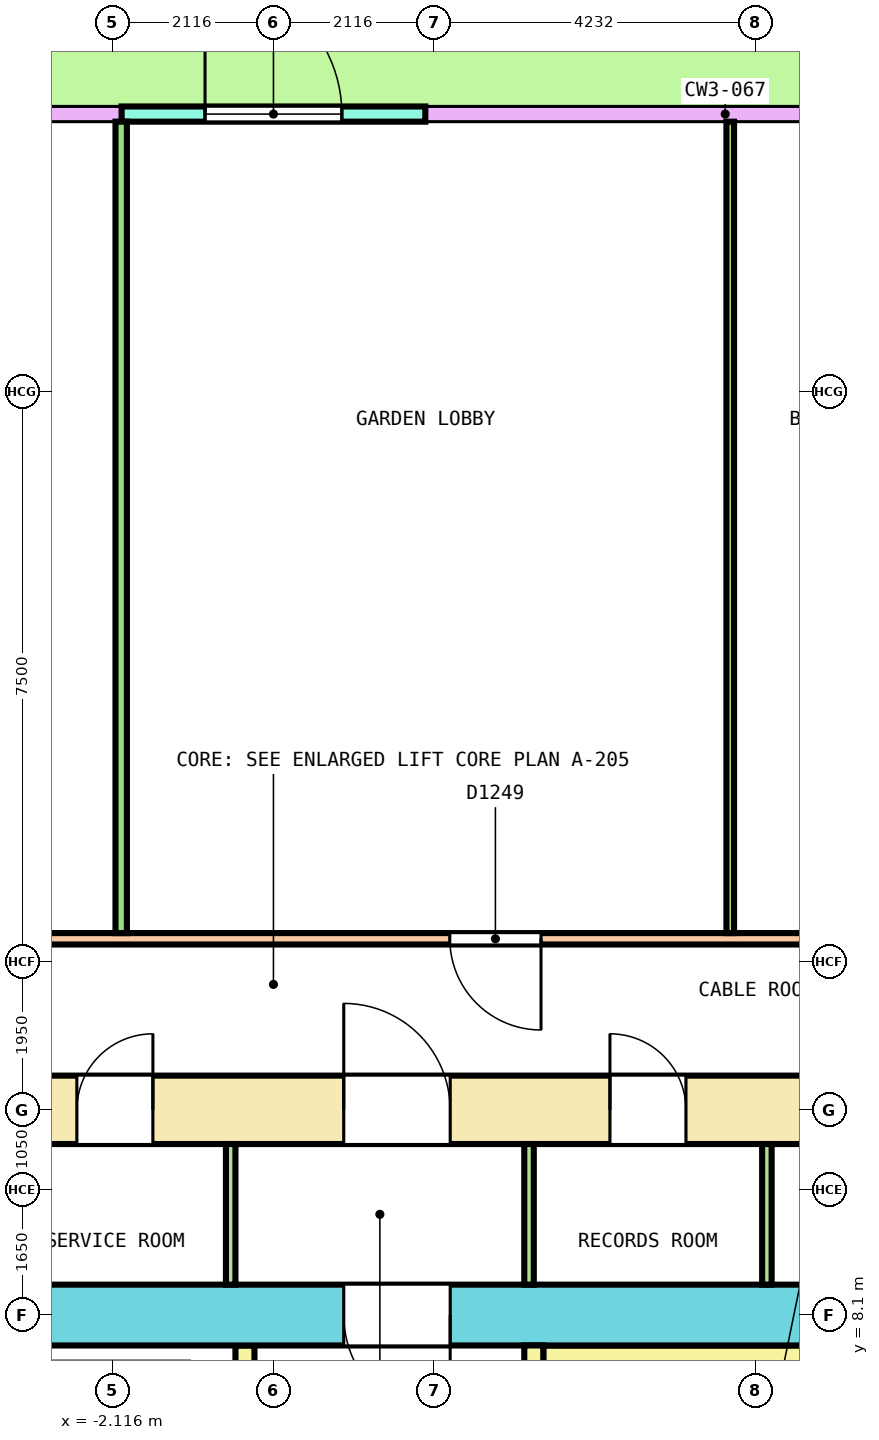
"""IFC4 building model, lengths in metres.
Left out: names, types, materials, properties, quantities, classifications, styles, units other than length and angle.
Written with IfcOpenShell. Run it as: python <this file> out.ifc"""

import sys

from ifc_helpers import new_model, si_unit, direction, frame, frame_2d, origin, place, context, subcontext, project, spatial, rectangle, extrude, element, fill, save


model = new_model("IFC4")
c1 = context("Model", 3, precision=1e-05, world=origin(), true_north=direction((0.0, 1.0)))
c2 = subcontext(c1, "Body", "Model", "MODEL_VIEW")
j1 = project(units=[si_unit("LENGTHUNIT", "METRE"), si_unit("PLANEANGLEUNIT", "RADIAN")], contexts=[c1])
p1 = place(None, origin())
s1 = spatial("IfcSite", under=j1, at=p1, CompositionType="ELEMENT")
p2 = place(p1, origin())
s2 = spatial("IfcBuilding", under=s1, at=p2, CompositionType="ELEMENT")
p3 = place(p2, frame((0.0, 0.0, 19.0)))
s3 = spatial("IfcBuildingStorey", under=s2, at=p3, CompositionType="ELEMENT", Elevation=19.0)
p4 = place(p3, frame((1.998, 23.9, 0.0), z_axis=(0.0, 0.0, 1.0), x_axis=(-1.0, 0.0, 0.0)))
e1 = element("IfcWall", 1, at=p4, inside=s3, PredefinedType="SOLIDWALL", context=c2, shape_type="SweptSolid", body=[
    extrude(rectangle(XDim=3.996, YDim=0.2, at=frame_2d((1.998, 0.0))), origin(), (0.0, 0.0, 1.0), 4.1),
])
p5 = place(p4, frame((1.098, 0.0, 0.0)))
e2 = element("IfcOpeningElement", 2, at=p5, cuts=e1, PredefinedType="OPENING", context=c2, shape_type="SweptSolid", body=[
    extrude(rectangle(XDim=1.8, YDim=2.4, at=frame_2d((0.9, 1.2))), frame((0.0, 0.11, 0.0), z_axis=(0.0, -1.0, 0.0), x_axis=(1.0, 0.0, 0.0)), (0.0, 0.0, 1.0), 0.22),
])
p6 = place(p4, frame((1.098, 0.0, 2.55)))
e3 = element("IfcOpeningElement", 3, at=p6, cuts=e1, PredefinedType="OPENING", context=c2, shape_type="SweptSolid", body=[
    extrude(rectangle(XDim=1.8, YDim=0.45, at=frame_2d((0.9, 0.225))), frame((0.0, 0.11, 0.0), z_axis=(0.0, -1.0, 0.0), x_axis=(1.0, 0.0, 0.0)), (0.0, 0.0, 1.0), 0.22),
])
p7 = place(p3, frame((-13.65, 10.8, 0.0), z_axis=(0.0, 0.0, 1.0), x_axis=(1.0, 0.0, 0.0)))
e4 = element("IfcWall", 4, at=p7, inside=s3, PredefinedType="SHEAR", context=c2, shape_type="SweptSolid", body=[
    extrude(rectangle(XDim=27.3, YDim=0.9, at=frame_2d((13.65, 0.0))), origin(), (0.0, 0.0, 1.0), 4.1),
])
p8 = place(p7, frame((1.892, 0.0, 0.0)))
e5 = element("IfcOpeningElement", 5, at=p8, cuts=e4, PredefinedType="OPENING", context=c2, shape_type="SweptSolid", body=[
    extrude(rectangle(XDim=1.0, YDim=2.1, at=frame_2d((0.5, 1.05))), frame((0.0, 0.46, 0.0), z_axis=(0.0, -1.0, 0.0), x_axis=(1.0, 0.0, 0.0)), (0.0, 0.0, 1.0), 0.92),
])
p9 = place(p7, frame((4.97, 0.0, 0.0)))
e6 = element("IfcOpeningElement", 6, at=p9, cuts=e4, PredefinedType="OPENING", context=c2, shape_type="SweptSolid", body=[
    extrude(rectangle(XDim=1.0, YDim=2.1, at=frame_2d((0.5, 1.05))), frame((0.0, 0.46, 0.0), z_axis=(0.0, -1.0, 0.0), x_axis=(1.0, 0.0, 0.0)), (0.0, 0.0, 1.0), 0.92),
])
p10 = place(p7, frame((8.017, 0.0, 0.0)))
e7 = element("IfcOpeningElement", 7, at=p10, cuts=e4, PredefinedType="OPENING", context=c2, shape_type="SweptSolid", body=[
    extrude(rectangle(XDim=1.0, YDim=2.1, at=frame_2d((0.5, 1.05))), frame((0.0, 0.46, 0.0), z_axis=(0.0, -1.0, 0.0), x_axis=(1.0, 0.0, 0.0)), (0.0, 0.0, 1.0), 0.92),
])
p11 = place(p7, frame((11.064, 0.0, 0.0)))
e8 = element("IfcOpeningElement", 8, at=p11, cuts=e4, PredefinedType="OPENING", context=c2, shape_type="SweptSolid", body=[
    extrude(rectangle(XDim=1.0, YDim=2.1, at=frame_2d((0.5, 1.05))), frame((0.0, 0.46, 0.0), z_axis=(0.0, -1.0, 0.0), x_axis=(1.0, 0.0, 0.0)), (0.0, 0.0, 1.0), 0.92),
])
p12 = place(p7, frame((18.077, 0.0, 0.0)))
e9 = element("IfcOpeningElement", 9, at=p12, cuts=e4, PredefinedType="OPENING", context=c2, shape_type="SweptSolid", body=[
    extrude(rectangle(XDim=1.0, YDim=2.1, at=frame_2d((0.5, 1.05))), frame((0.0, 0.46, 0.0), z_axis=(0.0, -1.0, 0.0), x_axis=(1.0, 0.0, 0.0)), (0.0, 0.0, 1.0), 0.92),
])
p13 = place(p7, frame((21.206, 0.0, 0.0)))
e10 = element("IfcOpeningElement", 10, at=p13, cuts=e4, PredefinedType="OPENING", context=c2, shape_type="SweptSolid", body=[
    extrude(rectangle(XDim=1.0, YDim=2.1, at=frame_2d((0.5, 1.05))), frame((0.0, 0.46, 0.0), z_axis=(0.0, -1.0, 0.0), x_axis=(1.0, 0.0, 0.0)), (0.0, 0.0, 1.0), 0.92),
])
p14 = place(p7, frame((24.367, 0.0, 0.0)))
e11 = element("IfcOpeningElement", 11, at=p14, cuts=e4, PredefinedType="OPENING", context=c2, shape_type="SweptSolid", body=[
    extrude(rectangle(XDim=1.0, YDim=2.1, at=frame_2d((0.5, 1.05))), frame((0.0, 0.46, 0.0), z_axis=(0.0, -1.0, 0.0), x_axis=(1.0, 0.0, 0.0)), (0.0, 0.0, 1.0), 0.92),
])
p15 = place(p7, frame((14.575, 0.0, 0.0)))
e12 = element("IfcOpeningElement", 12, at=p15, cuts=e4, PredefinedType="OPENING", context=c2, shape_type="SweptSolid", body=[
    extrude(rectangle(XDim=1.4, YDim=2.1, at=frame_2d((0.7, 1.05))), frame((0.0, 0.46, 0.0), z_axis=(0.0, -1.0, 0.0), x_axis=(1.0, 0.0, 0.0)), (0.0, 0.0, 1.0), 0.92),
])
p16 = place(p3, frame((-12.75, 8.1, 0.0), z_axis=(0.0, 0.0, 1.0), x_axis=(1.0, 0.0, 0.0)))
e13 = element("IfcWall", 13, at=p16, inside=s3, PredefinedType="SHEAR", context=c2, shape_type="SweptSolid", body=[
    extrude(rectangle(XDim=25.5, YDim=0.8, at=frame_2d((12.75, 0.0))), origin(), (0.0, 0.0, 1.0), 4.1),
])
p17 = place(p16, frame((13.675, 0.0, 0.0)))
e14 = element("IfcOpeningElement", 14, at=p17, cuts=e13, PredefinedType="OPENING", context=c2, shape_type="SweptSolid", body=[
    extrude(rectangle(XDim=1.4, YDim=2.1, at=frame_2d((0.7, 1.05))), frame((0.0, 0.41, 0.0), z_axis=(0.0, -1.0, 0.0), x_axis=(1.0, 0.0, 0.0)), (0.0, 0.0, 1.0), 0.82),
])
p18 = place(p3, frame((3.55, 7.575, 0.0), z_axis=(0.0, 0.0, 1.0), x_axis=(1.0, 0.0, 0.0)))
e15 = element("IfcWall", 15, at=p18, inside=s3, PredefinedType="SOLIDWALL", context=c2, shape_type="SweptSolid", body=[
    extrude(rectangle(XDim=5.8, YDim=0.25, at=frame_2d((2.9, 0.0))), origin(), (0.0, 0.0, 1.0), 4.1),
])
p19 = place(p3, frame((-0.375, 4.9, 0.0), z_axis=(0.0, 0.0, 1.0), x_axis=(0.0, 1.0, 0.0)))
e16 = element("IfcWall", 16, at=p19, inside=s3, PredefinedType="SOLIDWALL", context=c2, shape_type="SweptSolid", body=[
    extrude(rectangle(XDim=2.8, YDim=0.25, at=frame_2d((1.4, 0.0))), origin(), (0.0, 0.0, 1.0), 4.1),
])
p20 = place(p19, frame((0.7, 0.0, 0.0)))
e17 = element("IfcOpeningElement", 17, at=p20, cuts=e16, PredefinedType="OPENING", context=c2, shape_type="SweptSolid", body=[
    extrude(rectangle(XDim=1.4, YDim=2.1, at=frame_2d((0.7, 1.05))), frame((0.0, 0.135, 0.0), z_axis=(0.0, -1.0, 0.0), x_axis=(1.0, 0.0, 0.0)), (0.0, 0.0, 1.0), 0.27),
])
p21 = place(p3, frame((3.425, 4.9, 0.0), z_axis=(0.0, 0.0, 1.0), x_axis=(0.0, 1.0, 0.0)))
e18 = element("IfcWall", 18, at=p21, inside=s3, PredefinedType="SOLIDWALL", context=c2, shape_type="SweptSolid", body=[
    extrude(rectangle(XDim=2.8, YDim=0.25, at=frame_2d((1.4, 0.0))), origin(), (0.0, 0.0, 1.0), 4.1),
])
for number, where, z_axis, x_axis in (
    (19, (-0.562, 8.5, 0.0), (0.0, 0.0, 1.0), (0.0, 1.0, 0.0)),
    (20, (3.363, 8.5, 0.0), (0.0, 0.0, 1.0), (0.0, 1.0, 0.0)),
    (21, (6.492, 8.5, 0.0), (0.0, 0.0, 1.0), (0.0, 1.0, 0.0)),
):
    element("IfcWall", number, at=place(p3, frame(where, z_axis=z_axis, x_axis=x_axis)), inside=s3, PredefinedType="PARTITIONING", context=c2, shape_type="SweptSolid", body=[
        extrude(rectangle(XDim=1.85, YDim=0.125, at=frame_2d((0.925, 0.0))), origin(), (0.0, 0.0, 1.0), 4.1),
    ])
p22 = place(p3, frame((-15.375, 13.05, 0.0), z_axis=(0.0, 0.0, 1.0), x_axis=(1.0, 0.0, 0.0)))
e22 = element("IfcWall", 22, at=p22, inside=s3, PredefinedType="PARTITIONING", context=c2, shape_type="SweptSolid", body=[
    extrude(rectangle(XDim=30.75, YDim=0.15, at=frame_2d((15.375, 0.0))), origin(), (0.0, 0.0, 1.0), 3.05),
])
p23 = place(p22, frame((27.608, 0.0, 0.0)))
e23 = element("IfcOpeningElement", 23, at=p23, cuts=e22, PredefinedType="OPENING", context=c2, shape_type="SweptSolid", body=[
    extrude(rectangle(XDim=1.0, YDim=2.1, at=frame_2d((0.5, 1.05))), frame((0.0, 0.085, 0.0), z_axis=(0.0, -1.0, 0.0), x_axis=(1.0, 0.0, 0.0)), (0.0, 0.0, 1.0), 0.17),
])
p24 = place(p22, frame((23.465, 0.0, 0.0)))
e24 = element("IfcOpeningElement", 24, at=p24, cuts=e22, PredefinedType="OPENING", context=c2, shape_type="SweptSolid", body=[
    extrude(rectangle(XDim=1.0, YDim=2.1, at=frame_2d((0.5, 1.05))), frame((0.0, 0.085, 0.0), z_axis=(0.0, -1.0, 0.0), x_axis=(1.0, 0.0, 0.0)), (0.0, 0.0, 1.0), 0.17),
])
p25 = place(p22, frame((17.695, 0.0, 0.0)))
e25 = element("IfcOpeningElement", 25, at=p25, cuts=e22, PredefinedType="OPENING", context=c2, shape_type="SweptSolid", body=[
    extrude(rectangle(XDim=1.2, YDim=2.1, at=frame_2d((0.6, 1.05))), frame((0.0, 0.085, 0.0), z_axis=(0.0, -1.0, 0.0), x_axis=(1.0, 0.0, 0.0)), (0.0, 0.0, 1.0), 0.17),
])
p26 = place(p22, frame((11.084, 0.0, 0.0)))
e26 = element("IfcOpeningElement", 26, at=p26, cuts=e22, PredefinedType="OPENING", context=c2, shape_type="SweptSolid", body=[
    extrude(rectangle(XDim=1.2, YDim=2.1, at=frame_2d((0.6, 1.05))), frame((0.0, 0.085, 0.0), z_axis=(0.0, -1.0, 0.0), x_axis=(1.0, 0.0, 0.0)), (0.0, 0.0, 1.0), 0.17),
])
p27 = place(p22, frame((6.158, 0.0, 0.0)))
e27 = element("IfcOpeningElement", 27, at=p27, cuts=e22, PredefinedType="OPENING", context=c2, shape_type="SweptSolid", body=[
    extrude(rectangle(XDim=1.0, YDim=2.1, at=frame_2d((0.5, 1.05))), frame((0.0, 0.085, 0.0), z_axis=(0.0, -1.0, 0.0), x_axis=(1.0, 0.0, 0.0)), (0.0, 0.0, 1.0), 0.17),
])
p28 = place(p22, frame((0.825, 0.0, 0.0)))
e28 = element("IfcOpeningElement", 28, at=p28, cuts=e22, PredefinedType="OPENING", context=c2, shape_type="SweptSolid", body=[
    extrude(rectangle(XDim=1.0, YDim=2.1, at=frame_2d((0.5, 1.05))), frame((0.0, 0.085, 0.0), z_axis=(0.0, -1.0, 0.0), x_axis=(1.0, 0.0, 0.0)), (0.0, 0.0, 1.0), 0.17),
])
p29 = place(p3, frame((-2.003, 13.125, 0.0), z_axis=(0.0, 0.0, 1.0), x_axis=(0.0, 1.0, 0.0)))
e29 = element("IfcWall", 29, at=p29, inside=s3, PredefinedType="PARTITIONING", context=c2, shape_type="SweptSolid", body=[
    extrude(rectangle(XDim=10.675, YDim=0.15, at=frame_2d((5.337, 0.0))), origin(), (0.0, 0.0, 1.0), 3.05),
])
p30 = place(p3, frame((6.01, 13.125, 0.0), z_axis=(0.0, 0.0, 1.0), x_axis=(0.0, 1.0, 0.0)))
e30 = element("IfcWall", 30, at=p30, inside=s3, PredefinedType="PARTITIONING", context=c2, shape_type="SweptSolid", body=[
    extrude(rectangle(XDim=10.675, YDim=0.1, at=frame_2d((5.337, 0.0))), origin(), (0.0, 0.0, 1.0), 3.05),
])
p31 = place(p5, origin())
e31 = element("IfcDoor", 31, at=p31, inside=s3, OperationType="DOUBLE_DOOR_SINGLE_SWING", PredefinedType="DOOR", context=c2, shape_type="SweptSolid", body=[
    extrude(rectangle(XDim=1.8, YDim=2.4, at=frame_2d((0.9, 1.2))), frame((0.0, 0.025, 0.0), z_axis=(0.0, -1.0, 0.0), x_axis=(1.0, 0.0, 0.0)), (0.0, 0.0, 1.0), 0.05),
])
fill(e2, e31)
p32 = place(p6, origin())
e32 = element("IfcWindow", 32, at=p32, inside=s3, PartitioningType="SINGLE_PANEL", PredefinedType="WINDOW", context=c2, shape_type="SweptSolid", body=[
    extrude(rectangle(XDim=1.8, YDim=0.45, at=frame_2d((0.9, 0.225))), frame((0.0, 0.03, 0.0), z_axis=(0.0, -1.0, 0.0), x_axis=(1.0, 0.0, 0.0)), (0.0, 0.0, 1.0), 0.06),
])
fill(e3, e32)
p33 = place(p17, origin())
e33 = element("IfcDoor", 33, at=p33, inside=s3, OperationType="DOUBLE_DOOR_SINGLE_SWING", PredefinedType="DOOR", context=c2, shape_type="SweptSolid", body=[
    extrude(rectangle(XDim=1.4, YDim=2.1, at=frame_2d((0.7, 1.05))), frame((0.0, 0.3, 0.0), z_axis=(0.0, -1.0, 0.0), x_axis=(1.0, 0.0, 0.0)), (0.0, 0.0, 1.0), 0.6),
])
fill(e14, e33)
p34 = place(p11, origin())
e34 = element("IfcDoor", 34, at=p34, inside=s3, OperationType="SINGLE_SWING_LEFT", PredefinedType="DOOR", context=c2, shape_type="SweptSolid", body=[
    extrude(rectangle(XDim=1.0, YDim=2.1, at=frame_2d((0.5, 1.05))), frame((0.0, 0.3, 0.0), z_axis=(0.0, -1.0, 0.0), x_axis=(1.0, 0.0, 0.0)), (0.0, 0.0, 1.0), 0.6),
])
fill(e8, e34)
p35 = place(p12, origin())
e35 = element("IfcDoor", 35, at=p35, inside=s3, OperationType="SINGLE_SWING_RIGHT", PredefinedType="DOOR", context=c2, shape_type="SweptSolid", body=[
    extrude(rectangle(XDim=1.0, YDim=2.1, at=frame_2d((0.5, 1.05))), frame((0.0, 0.3, 0.0), z_axis=(0.0, -1.0, 0.0), x_axis=(1.0, 0.0, 0.0)), (0.0, 0.0, 1.0), 0.6),
])
fill(e9, e35)
p36 = place(p15, origin())
e36 = element("IfcDoor", 36, at=p36, inside=s3, OperationType="DOUBLE_DOOR_SINGLE_SWING", PredefinedType="DOOR", context=c2, shape_type="SweptSolid", body=[
    extrude(rectangle(XDim=1.4, YDim=2.1, at=frame_2d((0.7, 1.05))), frame((0.0, 0.3, 0.0), z_axis=(0.0, -1.0, 0.0), x_axis=(1.0, 0.0, 0.0)), (0.0, 0.0, 1.0), 0.6),
])
fill(e12, e36)
p37 = place(p25, origin())
e37 = element("IfcDoor", 37, at=p37, inside=s3, OperationType="DOUBLE_DOOR_SINGLE_SWING", PredefinedType="DOOR", context=c2, shape_type="SweptSolid", body=[
    extrude(rectangle(XDim=1.2, YDim=2.1, at=frame_2d((0.6, 1.05))), frame((0.0, 0.025, 0.0), z_axis=(0.0, -1.0, 0.0), x_axis=(1.0, 0.0, 0.0)), (0.0, 0.0, 1.0), 0.05),
])
fill(e25, e37)
save(model, sys.argv[1])
